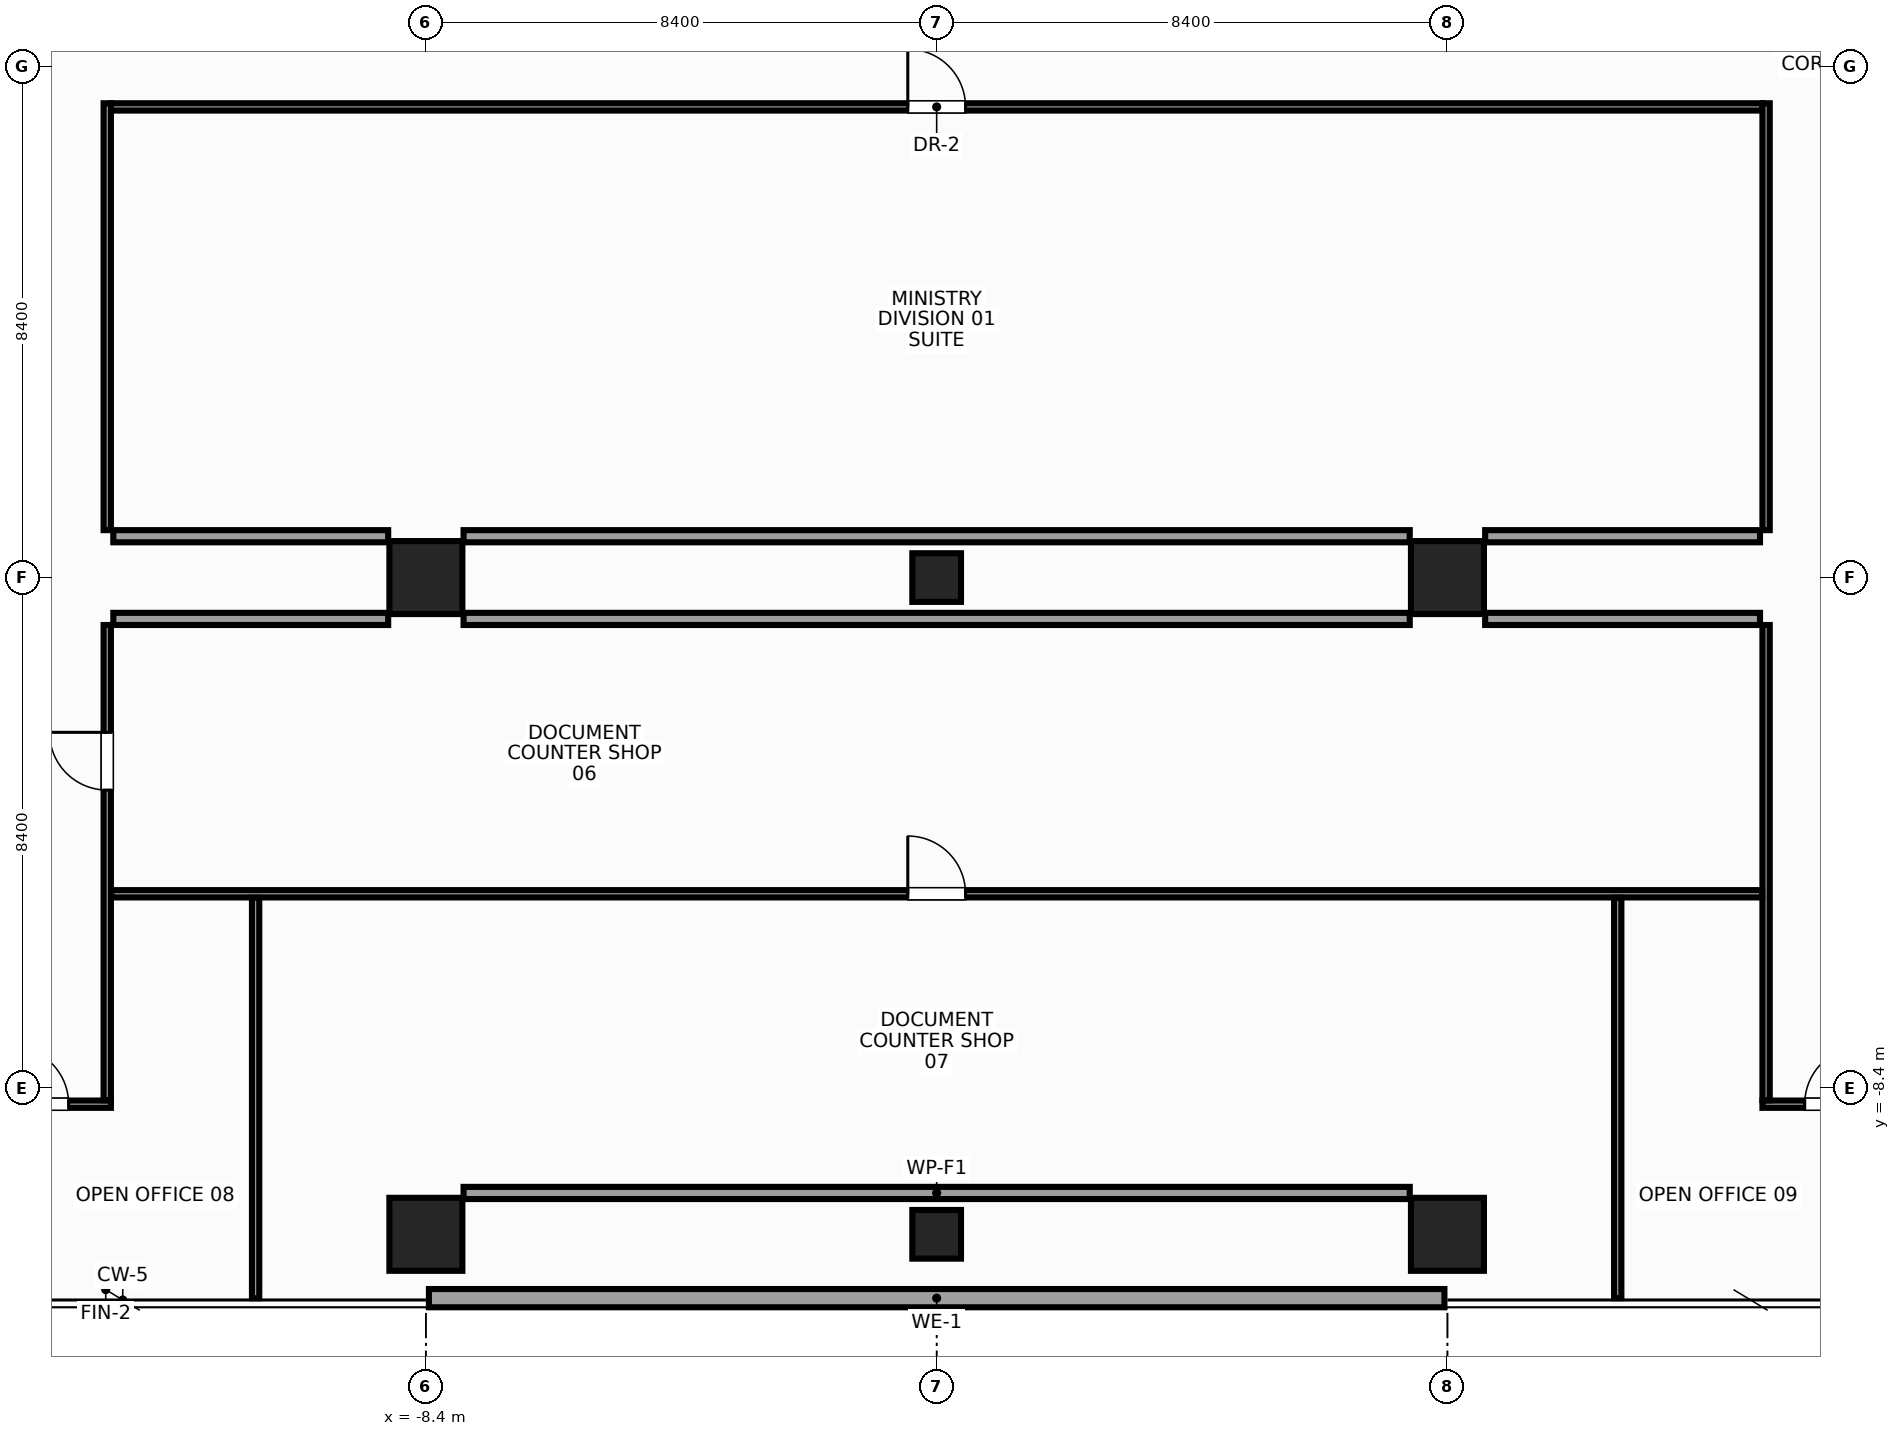
"""IFC4 building model, lengths in metres.
Left out: names, types, materials, properties, quantities, classifications, styles, units other than length and angle.
Written with IfcOpenShell. Run it as: python <this file> out.ifc"""

import sys

from ifc_helpers import new_model, si_unit, direction, frame, frame_2d, origin, origin_2d, place, context, subcontext, project, spatial, rectangle, hollow_rectangle, extrude, source, transform, mapped, element, fill, save


model = new_model("IFC4")
c1 = context("Model", 3, precision=1e-05, world=origin(), true_north=direction((0.0, 1.0)))
c2 = subcontext(c1, "Body", "Model", "MODEL_VIEW")
j1 = project(units=[si_unit("LENGTHUNIT", "METRE"), si_unit("PLANEANGLEUNIT", "RADIAN")], contexts=[c1])
p1 = place(None, origin())
s1 = spatial("IfcSite", under=j1, at=p1, CompositionType="ELEMENT")
p2 = place(p1, origin())
s2 = spatial("IfcBuilding", under=s1, at=p2, CompositionType="ELEMENT")
p3 = place(p2, frame((0.0, 0.0, 228.8)))
s3 = spatial("IfcBuildingStorey", under=s2, at=p3, CompositionType="ELEMENT", Elevation=228.8)
m1 = source(origin(), c2, "Body", "SweptSolid", [
    extrude(rectangle(XDim=1.2, YDim=1.2, at=origin_2d()), origin(), (0.0, 0.0, 1.0), 3.6),
])
for number, where, z_axis, x_axis in (
    (1, (-8.4, 0.0, 0.0), (0.0, 0.0, 1.0), (1.0, 0.0, 0.0)),
    (2, (-8.4, -10.8, 0.0), (0.0, 0.0, 1.0), (1.0, 0.0, 0.0)),
    (3, (8.4, 0.0, 0.0), (0.0, 0.0, 1.0), (1.0, 0.0, 0.0)),
    (4, (8.4, -10.8, 0.0), (0.0, 0.0, 1.0), (1.0, 0.0, 0.0)),
):
    element("IfcColumn", number, at=place(p3, frame(where, z_axis=z_axis, x_axis=x_axis)), inside=s3, PredefinedType="COLUMN", context=c2, shape_type="MappedRepresentation", body=[
        mapped(m1, transform((0.0, 0.0, 0.0), x_axis=(1.0, 0.0, 0.0), y_axis=(0.0, 1.0, 0.0), z_axis=(0.0, 0.0, 1.0), scale=1.0)),
    ])
m2 = source(origin(), c2, "Body", "SweptSolid", [
    extrude(hollow_rectangle(XDim=0.8, YDim=0.8, WallThickness=0.036, at=origin_2d()), origin(), (0.0, 0.0, 1.0), 3.92),
])
for number, where, z_axis, x_axis in (
    (5, (0.0, -10.8, -0.32), (0.0, 0.0, 1.0), (1.0, 0.0, 0.0)),
    (6, (0.0, 0.0, -0.32), (0.0, 0.0, 1.0), (1.0, 0.0, 0.0)),
):
    element("IfcColumn", number, at=place(p3, frame(where, z_axis=z_axis, x_axis=x_axis)), inside=s3, PredefinedType="COLUMN", context=c2, shape_type="MappedRepresentation", body=[
        mapped(m2, transform((0.0, 0.0, 0.0), x_axis=(1.0, 0.0, 0.0), y_axis=(0.0, 1.0, 0.0), z_axis=(0.0, 0.0, 1.0), scale=1.0)),
    ])
m3 = source(origin(), c2, "Body", "SweptSolid", [
    extrude(rectangle(XDim=16.7, YDim=0.3, at=frame_2d((8.35, 0.0))), origin(), (0.0, 0.0, 1.0), 2.75),
])
p4 = place(p3, frame((-8.35, -11.85, 0.0), z_axis=(0.0, 0.0, 1.0), x_axis=(1.0, 0.0, 0.0)))
e7 = element("IfcWall", 7, at=p4, inside=s3, PredefinedType="STANDARD", context=c2, shape_type="MappedRepresentation", body=[
    mapped(m3, transform((0.0, 0.0, 0.0), x_axis=(1.0, 0.0, 0.0), y_axis=(0.0, 1.0, 0.0), z_axis=(0.0, 0.0, 1.0), scale=1.0)),
])
m4 = source(origin(), c2, "Body", "SweptSolid", [
    extrude(rectangle(XDim=15.56, YDim=0.2, at=frame_2d((7.78, 0.0))), origin(), (0.0, 0.0, 1.0), 2.755),
])
p5 = place(p3, frame((-7.78, -10.12, 0.0), z_axis=(0.0, 0.0, 1.0), x_axis=(1.0, 0.0, 0.0)))
e8 = element("IfcWall", 8, at=p5, inside=s3, PredefinedType="PARTITIONING", context=c2, shape_type="MappedRepresentation", body=[
    mapped(m4, transform((0.0, 0.0, 0.0), x_axis=(1.0, 0.0, 0.0), y_axis=(0.0, 1.0, 0.0), z_axis=(0.0, 0.0, 1.0), scale=1.0)),
])
m5 = source(origin(), c2, "Body", "SweptSolid", [
    extrude(rectangle(XDim=4.52, YDim=0.2, at=frame_2d((2.26, 0.0))), origin(), (0.0, 0.0, 1.0), 3.37),
])
p6 = place(p3, frame((-13.54, 0.68, 0.0), z_axis=(0.0, 0.0, 1.0), x_axis=(1.0, 0.0, 0.0)))
e9 = element("IfcWall", 9, at=p6, inside=s3, PredefinedType="PARTITIONING", context=c2, shape_type="MappedRepresentation", body=[
    mapped(m5, transform((0.0, 0.0, 0.0), x_axis=(1.0, 0.0, 0.0), y_axis=(0.0, 1.0, 0.0), z_axis=(0.0, 0.0, 1.0), scale=1.0)),
])
m6 = source(origin(), c2, "Body", "SweptSolid", [
    extrude(rectangle(XDim=15.56, YDim=0.2, at=frame_2d((7.78, 0.0))), origin(), (0.0, 0.0, 1.0), 3.37),
])
p7 = place(p3, frame((-7.78, 0.68, 0.0), z_axis=(0.0, 0.0, 1.0), x_axis=(1.0, 0.0, 0.0)))
e10 = element("IfcWall", 10, at=p7, inside=s3, PredefinedType="PARTITIONING", context=c2, shape_type="MappedRepresentation", body=[
    mapped(m6, transform((0.0, 0.0, 0.0), x_axis=(1.0, 0.0, 0.0), y_axis=(0.0, 1.0, 0.0), z_axis=(0.0, 0.0, 1.0), scale=1.0)),
])
for number, where, z_axis, x_axis in (
    (11, (9.02, 0.68, 0.0), (0.0, 0.0, 1.0), (1.0, 0.0, 0.0)),
    (12, (-13.54, -0.68, 0.0), (0.0, 0.0, 1.0), (1.0, 0.0, 0.0)),
):
    element("IfcWall", number, at=place(p3, frame(where, z_axis=z_axis, x_axis=x_axis)), inside=s3, PredefinedType="PARTITIONING", context=c2, shape_type="MappedRepresentation", body=[
        mapped(m5, transform((0.0, 0.0, 0.0), x_axis=(1.0, 0.0, 0.0), y_axis=(0.0, 1.0, 0.0), z_axis=(0.0, 0.0, 1.0), scale=1.0)),
    ])
p8 = place(p3, frame((-7.78, -0.68, 0.0), z_axis=(0.0, 0.0, 1.0), x_axis=(1.0, 0.0, 0.0)))
e13 = element("IfcWall", 13, at=p8, inside=s3, PredefinedType="PARTITIONING", context=c2, shape_type="MappedRepresentation", body=[
    mapped(m4, transform((0.0, 0.0, 0.0), x_axis=(1.0, 0.0, 0.0), y_axis=(0.0, 1.0, 0.0), z_axis=(0.0, 0.0, 1.0), scale=1.0)),
])
p9 = place(p3, frame((9.02, -0.68, 0.0), z_axis=(0.0, 0.0, 1.0), x_axis=(1.0, 0.0, 0.0)))
e14 = element("IfcWall", 14, at=p9, inside=s3, PredefinedType="PARTITIONING", context=c2, shape_type="MappedRepresentation", body=[
    mapped(m5, transform((0.0, 0.0, 0.0), x_axis=(1.0, 0.0, 0.0), y_axis=(0.0, 1.0, 0.0), z_axis=(0.0, 0.0, 1.0), scale=1.0)),
])
m7 = source(origin(), c2, "Body", "SweptSolid", [
    extrude(rectangle(XDim=27.16, YDim=0.12, at=frame_2d((13.58, 0.0))), origin(), (0.0, 0.0, 1.0), 3.37),
])
p10 = place(p3, frame((-13.58, 7.74, 0.0), z_axis=(0.0, 0.0, 1.0), x_axis=(1.0, 0.0, 0.0)))
e15 = element("IfcWall", 15, at=p10, inside=s3, PredefinedType="PARTITIONING", context=c2, shape_type="MappedRepresentation", body=[
    mapped(m7, transform((0.0, 0.0, 0.0), x_axis=(1.0, 0.0, 0.0), y_axis=(0.0, 1.0, 0.0), z_axis=(0.0, 0.0, 1.0), scale=1.0)),
])
p11 = place(p10, frame((13.105, 0.0, 0.0)))
e16 = element("IfcOpeningElement", 16, at=p11, cuts=e15, PredefinedType="OPENING", context=c2, shape_type="SweptSolid", body=[
    extrude(rectangle(XDim=0.95, YDim=2.15, at=frame_2d((0.475, 1.075))), frame((0.0, 0.072, 0.0), z_axis=(0.0, -1.0, 0.0), x_axis=(1.0, 0.0, 0.0)), (0.0, 0.0, 1.0), 0.144),
])
m8 = source(origin(), c2, "Body", "SweptSolid", [
    extrude(rectangle(XDim=2.34, YDim=0.12, at=frame_2d((1.17, 0.0))), origin(), (0.0, 0.0, 1.0), 3.37),
])
p12 = place(p3, frame((-15.92, -8.66, 0.0), z_axis=(0.0, 0.0, 1.0), x_axis=(1.0, 0.0, 0.0)))
e17 = element("IfcWall", 17, at=p12, inside=s3, PredefinedType="PARTITIONING", context=c2, shape_type="MappedRepresentation", body=[
    mapped(m8, transform((0.0, 0.0, 0.0), x_axis=(1.0, 0.0, 0.0), y_axis=(0.0, 1.0, 0.0), z_axis=(0.0, 0.0, 1.0), scale=1.0)),
])
p13 = place(p12, frame((0.695, 0.0, 0.0)))
e18 = element("IfcOpeningElement", 18, at=p13, cuts=e17, PredefinedType="OPENING", context=c2, shape_type="SweptSolid", body=[
    extrude(rectangle(XDim=0.95, YDim=2.15, at=frame_2d((0.475, 1.075))), frame((0.0, 0.072, 0.0), z_axis=(0.0, -1.0, 0.0), x_axis=(1.0, 0.0, 0.0)), (0.0, 0.0, 1.0), 0.144),
])
p14 = place(p3, frame((13.58, -8.66, 0.0), z_axis=(0.0, 0.0, 1.0), x_axis=(1.0, 0.0, 0.0)))
e19 = element("IfcWall", 19, at=p14, inside=s3, PredefinedType="PARTITIONING", context=c2, shape_type="MappedRepresentation", body=[
    mapped(m8, transform((0.0, 0.0, 0.0), x_axis=(1.0, 0.0, 0.0), y_axis=(0.0, 1.0, 0.0), z_axis=(0.0, 0.0, 1.0), scale=1.0)),
])
p15 = place(p14, frame((0.695, 0.0, 0.0)))
e20 = element("IfcOpeningElement", 20, at=p15, cuts=e19, PredefinedType="OPENING", context=c2, shape_type="SweptSolid", body=[
    extrude(rectangle(XDim=0.95, YDim=2.15, at=frame_2d((0.475, 1.075))), frame((0.0, 0.072, 0.0), z_axis=(0.0, -1.0, 0.0), x_axis=(1.0, 0.0, 0.0)), (0.0, 0.0, 1.0), 0.144),
])
m9 = source(origin(), c2, "Body", "SweptSolid", [
    extrude(rectangle(XDim=7.815, YDim=0.12, at=frame_2d((3.907, 0.0))), origin(), (0.0, 0.0, 1.0), 3.37),
])
p16 = place(p3, frame((-13.64, -8.595, 0.0), z_axis=(0.0, 0.0, 1.0), x_axis=(0.0, 1.0, 0.0)))
e21 = element("IfcWall", 21, at=p16, inside=s3, PredefinedType="PARTITIONING", context=c2, shape_type="MappedRepresentation", body=[
    mapped(m9, transform((0.0, 0.0, 0.0), x_axis=(1.0, 0.0, 0.0), y_axis=(0.0, 1.0, 0.0), z_axis=(0.0, 0.0, 1.0), scale=1.0)),
])
p17 = place(p16, frame((5.1, 0.0, 0.0)))
e22 = element("IfcOpeningElement", 22, at=p17, cuts=e21, PredefinedType="OPENING", context=c2, shape_type="SweptSolid", body=[
    extrude(rectangle(XDim=0.95, YDim=2.15, at=frame_2d((0.475, 1.075))), frame((0.0, 0.072, 0.0), z_axis=(0.0, -1.0, 0.0), x_axis=(1.0, 0.0, 0.0)), (0.0, 0.0, 1.0), 0.144),
])
m10 = source(origin(), c2, "Body", "SweptSolid", [
    extrude(rectangle(XDim=7.02, YDim=0.12, at=frame_2d((3.51, 0.0))), origin(), (0.0, 0.0, 1.0), 2.655),
])
p18 = place(p3, frame((-13.64, 0.78, 0.0), z_axis=(0.0, 0.0, 1.0), x_axis=(0.0, 1.0, 0.0)))
e23 = element("IfcWall", 23, at=p18, inside=s3, PredefinedType="PARTITIONING", context=c2, shape_type="MappedRepresentation", body=[
    mapped(m10, transform((0.0, 0.0, 0.0), x_axis=(1.0, 0.0, 0.0), y_axis=(0.0, 1.0, 0.0), z_axis=(0.0, 0.0, 1.0), scale=1.0)),
])
p19 = place(p3, frame((13.64, -8.595, 0.0), z_axis=(0.0, 0.0, 1.0), x_axis=(0.0, 1.0, 0.0)))
e24 = element("IfcWall", 24, at=p19, inside=s3, PredefinedType="PARTITIONING", context=c2, shape_type="MappedRepresentation", body=[
    mapped(m9, transform((0.0, 0.0, 0.0), x_axis=(1.0, 0.0, 0.0), y_axis=(0.0, 1.0, 0.0), z_axis=(0.0, 0.0, 1.0), scale=1.0)),
])
p20 = place(p3, frame((13.64, 0.78, 0.0), z_axis=(0.0, 0.0, 1.0), x_axis=(0.0, 1.0, 0.0)))
e25 = element("IfcWall", 25, at=p20, inside=s3, PredefinedType="PARTITIONING", context=c2, shape_type="MappedRepresentation", body=[
    mapped(m10, transform((0.0, 0.0, 0.0), x_axis=(1.0, 0.0, 0.0), y_axis=(0.0, 1.0, 0.0), z_axis=(0.0, 0.0, 1.0), scale=1.0)),
])
m11 = source(origin(), c2, "Body", "SweptSolid", [
    extrude(rectangle(XDim=27.15, YDim=0.12, at=frame_2d((13.575, 0.0))), origin(), (0.0, 0.0, 1.0), 2.755),
])
p21 = place(p3, frame((-13.575, -5.2, 0.0), z_axis=(0.0, 0.0, 1.0), x_axis=(1.0, 0.0, 0.0)))
e26 = element("IfcWall", 26, at=p21, inside=s3, PredefinedType="PARTITIONING", context=c2, shape_type="MappedRepresentation", body=[
    mapped(m11, transform((0.0, 0.0, 0.0), x_axis=(1.0, 0.0, 0.0), y_axis=(0.0, 1.0, 0.0), z_axis=(0.0, 0.0, 1.0), scale=1.0)),
])
p22 = place(p21, frame((13.1, 0.0, 0.0)))
e27 = element("IfcOpeningElement", 27, at=p22, cuts=e26, PredefinedType="OPENING", context=c2, shape_type="SweptSolid", body=[
    extrude(rectangle(XDim=0.95, YDim=2.15, at=frame_2d((0.475, 1.075))), frame((0.0, 0.072, 0.0), z_axis=(0.0, -1.0, 0.0), x_axis=(1.0, 0.0, 0.0)), (0.0, 0.0, 1.0), 0.144),
])
m12 = source(origin(), c2, "Body", "SweptSolid", [
    extrude(rectangle(XDim=6.585, YDim=0.12, at=frame_2d((3.292, 0.0))), origin(), (0.0, 0.0, 1.0), 2.905),
])
for number, where, z_axis, x_axis in (
    (28, (-11.2, -11.85, 0.0), (0.0, 0.0, 1.0), (0.0, 1.0, 0.0)),
    (29, (11.2, -11.85, 0.0), (0.0, 0.0, 1.0), (0.0, 1.0, 0.0)),
):
    element("IfcWall", number, at=place(p3, frame(where, z_axis=z_axis, x_axis=x_axis)), inside=s3, PredefinedType="PARTITIONING", context=c2, shape_type="MappedRepresentation", body=[
        mapped(m12, transform((0.0, 0.0, 0.0), x_axis=(1.0, 0.0, 0.0), y_axis=(0.0, 1.0, 0.0), z_axis=(0.0, 0.0, 1.0), scale=1.0)),
    ])
m13 = source(origin(), c2, "Body", "SweptSolid", [
    extrude(rectangle(XDim=0.95, YDim=2.15, at=frame_2d((0.475, 1.075))), frame((0.0, 0.025, 0.0), z_axis=(0.0, -1.0, 0.0), x_axis=(1.0, 0.0, 0.0)), (0.0, 0.0, 1.0), 0.05),
])
p23 = place(p11, origin())
e30 = element("IfcDoor", 30, at=p23, inside=s3, OperationType="SINGLE_SWING_LEFT", PredefinedType="DOOR", context=c2, shape_type="MappedRepresentation", body=[
    mapped(m13, transform((0.0, 0.0, 0.0), x_axis=(1.0, 0.0, 0.0), y_axis=(0.0, 1.0, 0.0), z_axis=(0.0, 0.0, 1.0), scale=1.0)),
])
fill(e16, e30)
p24 = place(p17, origin())
e31 = element("IfcDoor", 31, at=p24, inside=s3, OperationType="SINGLE_SWING_RIGHT", PredefinedType="DOOR", context=c2, shape_type="MappedRepresentation", body=[
    mapped(m13, transform((0.0, 0.0, 0.0), x_axis=(1.0, 0.0, 0.0), y_axis=(0.0, 1.0, 0.0), z_axis=(0.0, 0.0, 1.0), scale=1.0)),
])
fill(e22, e31)
p25 = place(p13, origin())
e32 = element("IfcDoor", 32, at=p25, inside=s3, OperationType="SINGLE_SWING_LEFT", PredefinedType="DOOR", context=c2, shape_type="MappedRepresentation", body=[
    mapped(m13, transform((0.0, 0.0, 0.0), x_axis=(1.0, 0.0, 0.0), y_axis=(0.0, 1.0, 0.0), z_axis=(0.0, 0.0, 1.0), scale=1.0)),
])
fill(e18, e32)
p26 = place(p15, origin())
e33 = element("IfcDoor", 33, at=p26, inside=s3, OperationType="SINGLE_SWING_RIGHT", PredefinedType="DOOR", context=c2, shape_type="MappedRepresentation", body=[
    mapped(m13, transform((0.0, 0.0, 0.0), x_axis=(1.0, 0.0, 0.0), y_axis=(0.0, 1.0, 0.0), z_axis=(0.0, 0.0, 1.0), scale=1.0)),
])
fill(e20, e33)
p27 = place(p22, origin())
e34 = element("IfcDoor", 34, at=p27, inside=s3, OperationType="SINGLE_SWING_LEFT", PredefinedType="DOOR", context=c2, shape_type="MappedRepresentation", body=[
    mapped(m13, transform((0.0, 0.0, 0.0), x_axis=(1.0, 0.0, 0.0), y_axis=(0.0, 1.0, 0.0), z_axis=(0.0, 0.0, 1.0), scale=1.0)),
])
fill(e27, e34)
save(model, sys.argv[1])
